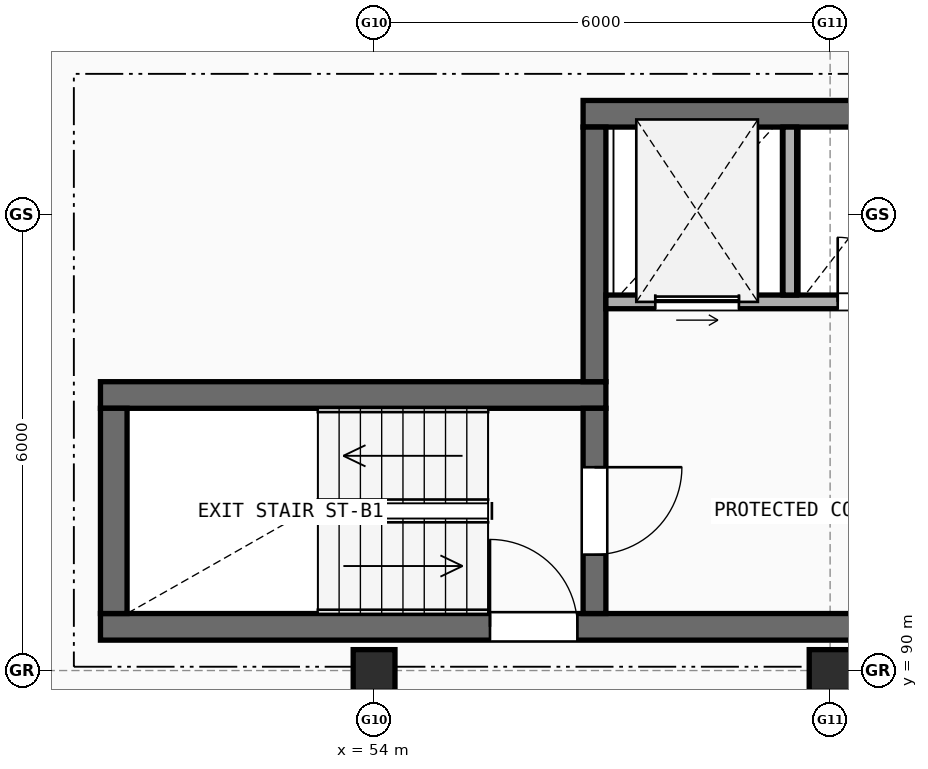
"""IFC4 building model, lengths in metres.
Left out: names, types, materials, properties, quantities, classifications, styles, units other than length and angle.
Written with IfcOpenShell. Run it as: python <this file> out.ifc"""

import sys

from ifc_helpers import new_model, si_unit, direction, frame, frame_2d, origin, origin_2d, place, context, subcontext, project, spatial, rectangle, extrude, element, fill, save


model = new_model("IFC4")
c1 = context("Model", 3, precision=1e-05, world=origin(), true_north=direction((0.0, 1.0)))
c2 = subcontext(c1, "Body", "Model", "MODEL_VIEW")
j1 = project(units=[si_unit("LENGTHUNIT", "METRE"), si_unit("PLANEANGLEUNIT", "RADIAN")], contexts=[c1])
p1 = place(None, origin())
s1 = spatial("IfcSite", under=j1, at=p1, CompositionType="ELEMENT")
p2 = place(p1, origin())
s2 = spatial("IfcBuilding", under=s1, at=p2, CompositionType="ELEMENT")
p3 = place(p2, frame((0.0, 0.0, 17.3)))
s3 = spatial("IfcBuildingStorey", under=s2, at=p3, CompositionType="ELEMENT", Elevation=17.3)
for number, where, z_axis, x_axis in (
    (1, (54.0, 90.0, 0.0), (0.0, 0.0, 1.0), (1.0, 0.0, 0.0)),
    (2, (60.0, 90.0, 0.0), (0.0, 0.0, 1.0), (1.0, 0.0, 0.0)),
):
    element("IfcColumn", number, at=place(p3, frame(where, z_axis=z_axis, x_axis=x_axis)), inside=s3, PredefinedType="COLUMN", context=c2, shape_type="SweptSolid", body=[
        extrude(rectangle(XDim=0.55, YDim=0.55, at=origin_2d()), origin(), (0.0, 0.0, 1.0), 2.965),
    ])
p4 = place(p3, frame((50.4, 90.575, 0.0), z_axis=(0.0, 0.0, 1.0), x_axis=(1.0, 0.0, 0.0)))
e3 = element("IfcWall", 3, at=p4, inside=s3, PredefinedType="SHEAR", context=c2, shape_type="SweptSolid", body=[
    extrude(rectangle(XDim=11.4, YDim=0.35, at=frame_2d((5.7, 0.0))), origin(), (0.0, 0.0, 1.0), 2.965),
])
p5 = place(p4, frame((5.125, 0.0, 0.0)))
e4 = element("IfcOpeningElement", 4, at=p5, cuts=e3, PredefinedType="OPENING", context=c2, shape_type="SweptSolid", body=[
    extrude(rectangle(XDim=1.15, YDim=2.15, at=frame_2d((0.575, 1.075))), frame((0.0, 0.185, 0.0), z_axis=(0.0, -1.0, 0.0), x_axis=(1.0, 0.0, 0.0)), (0.0, 0.0, 1.0), 0.37),
])
p6 = place(p3, frame((57.05, 93.625, 0.0), z_axis=(0.0, 0.0, 1.0), x_axis=(-1.0, 0.0, 0.0)))
e5 = element("IfcWall", 5, at=p6, inside=s3, PredefinedType="SHEAR", context=c2, shape_type="SweptSolid", body=[
    extrude(rectangle(XDim=6.65, YDim=0.35, at=frame_2d((3.325, 0.0))), origin(), (0.0, 0.0, 1.0), 2.965),
])
p7 = place(p3, frame((50.575, 93.45, 0.0), z_axis=(0.0, 0.0, 1.0), x_axis=(0.0, -1.0, 0.0)))
e6 = element("IfcWall", 6, at=p7, inside=s3, PredefinedType="SHEAR", context=c2, shape_type="SweptSolid", body=[
    extrude(rectangle(XDim=2.7, YDim=0.35, at=frame_2d((1.35, 0.0))), origin(), (0.0, 0.0, 1.0), 2.965),
])
p8 = place(p3, frame((56.9, 90.75, 0.0), z_axis=(0.0, 0.0, 1.0), x_axis=(0.0, 1.0, 0.0)))
e7 = element("IfcWall", 7, at=p8, inside=s3, PredefinedType="SHEAR", context=c2, shape_type="SweptSolid", body=[
    extrude(rectangle(XDim=2.7, YDim=0.3, at=frame_2d((1.35, 0.0))), origin(), (0.0, 0.0, 1.0), 2.965),
])
p9 = place(p8, frame((0.775, 0.0, 0.0)))
e8 = element("IfcOpeningElement", 8, at=p9, cuts=e7, PredefinedType="OPENING", context=c2, shape_type="SweptSolid", body=[
    extrude(rectangle(XDim=1.15, YDim=2.15, at=frame_2d((0.575, 1.075))), frame((0.0, 0.16, 0.0), z_axis=(0.0, -1.0, 0.0), x_axis=(1.0, 0.0, 0.0)), (0.0, 0.0, 1.0), 0.32),
])
p10 = place(p3, frame((61.8, 97.325, 0.0), z_axis=(0.0, 0.0, 1.0), x_axis=(-1.0, 0.0, 0.0)))
e9 = element("IfcWall", 9, at=p10, inside=s3, PredefinedType="SHEAR", context=c2, shape_type="SweptSolid", body=[
    extrude(rectangle(XDim=5.05, YDim=0.35, at=frame_2d((2.525, 0.0))), origin(), (0.0, 0.0, 1.0), 2.965),
])
p11 = place(p3, frame((56.9, 93.8, 0.0), z_axis=(0.0, 0.0, 1.0), x_axis=(0.0, 1.0, 0.0)))
e10 = element("IfcWall", 10, at=p11, inside=s3, PredefinedType="SHEAR", context=c2, shape_type="SweptSolid", body=[
    extrude(rectangle(XDim=3.35, YDim=0.3, at=frame_2d((1.675, 0.0))), origin(), (0.0, 0.0, 1.0), 2.965),
])
p12 = place(p3, frame((57.05, 94.85, 0.0), z_axis=(0.0, 0.0, 1.0), x_axis=(1.0, 0.0, 0.0)))
e11 = element("IfcWall", 11, at=p12, inside=s3, PredefinedType="SOLIDWALL", context=c2, shape_type="SweptSolid", body=[
    extrude(rectangle(XDim=4.4, YDim=0.18, at=frame_2d((2.2, 0.0))), origin(), (0.0, 0.0, 1.0), 2.965),
])
p13 = place(p12, frame((0.65, 0.0, 0.0)))
e12 = element("IfcOpeningElement", 12, at=p13, cuts=e11, PredefinedType="OPENING", context=c2, shape_type="SweptSolid", body=[
    extrude(rectangle(XDim=1.1, YDim=2.15, at=frame_2d((0.55, 1.075))), frame((0.0, 0.1, 0.0), z_axis=(0.0, -1.0, 0.0), x_axis=(1.0, 0.0, 0.0)), (0.0, 0.0, 1.0), 0.2),
])
p14 = place(p12, frame((3.05, 0.0, 0.0)))
e13 = element("IfcOpeningElement", 13, at=p14, cuts=e11, PredefinedType="OPENING", context=c2, shape_type="SweptSolid", body=[
    extrude(rectangle(XDim=0.85, YDim=2.1, at=frame_2d((0.425, 1.05))), frame((0.0, 0.1, 0.0), z_axis=(0.0, -1.0, 0.0), x_axis=(1.0, 0.0, 0.0)), (0.0, 0.0, 1.0), 0.2),
])
p15 = place(p3, frame((59.47, 94.94, 0.0), z_axis=(0.0, 0.0, 1.0), x_axis=(0.0, 1.0, 0.0)))
e14 = element("IfcWall", 14, at=p15, inside=s3, PredefinedType="SOLIDWALL", context=c2, shape_type="SweptSolid", body=[
    extrude(rectangle(XDim=2.21, YDim=0.18, at=frame_2d((1.105, 0.0))), origin(), (0.0, 0.0, 1.0), 2.965),
])
p16 = place(p5, origin())
e15 = element("IfcDoor", 15, at=p16, inside=s3, OperationType="SINGLE_SWING_LEFT", PredefinedType="DOOR", context=c2, shape_type="SweptSolid", body=[
    extrude(rectangle(XDim=1.15, YDim=2.15, at=frame_2d((0.575, 1.075))), frame((0.0, 0.025, 0.0), z_axis=(0.0, -1.0, 0.0), x_axis=(1.0, 0.0, 0.0)), (0.0, 0.0, 1.0), 0.05),
])
fill(e4, e15)
p17 = place(p9, origin())
e16 = element("IfcDoor", 16, at=p17, inside=s3, OperationType="SINGLE_SWING_RIGHT", PredefinedType="DOOR", context=c2, shape_type="SweptSolid", body=[
    extrude(rectangle(XDim=1.15, YDim=2.15, at=frame_2d((0.575, 1.075))), frame((0.0, 0.025, 0.0), z_axis=(0.0, -1.0, 0.0), x_axis=(1.0, 0.0, 0.0)), (0.0, 0.0, 1.0), 0.05),
])
fill(e8, e16)
p18 = place(p13, origin())
e17 = element("IfcDoor", 17, at=p18, inside=s3, OperationType="SLIDING_TO_LEFT", PredefinedType="DOOR", context=c2, shape_type="SweptSolid", body=[
    extrude(rectangle(XDim=1.1, YDim=2.15, at=frame_2d((0.55, 1.075))), frame((0.0, 0.025, 0.0), z_axis=(0.0, -1.0, 0.0), x_axis=(1.0, 0.0, 0.0)), (0.0, 0.0, 1.0), 0.05),
])
fill(e12, e17)
p19 = place(p14, frame((0.85, 0.0, 0.0), z_axis=(0.0, 0.0, 1.0), x_axis=(-1.0, 0.0, 0.0)))
e18 = element("IfcDoor", 18, at=p19, inside=s3, OperationType="SINGLE_SWING_LEFT", PredefinedType="DOOR", context=c2, shape_type="SweptSolid", body=[
    extrude(rectangle(XDim=0.85, YDim=2.1, at=frame_2d((0.425, 1.05))), frame((0.0, 0.025, 0.0), z_axis=(0.0, -1.0, 0.0), x_axis=(1.0, 0.0, 0.0)), (0.0, 0.0, 1.0), 0.05),
])
fill(e13, e18)
save(model, sys.argv[1])
